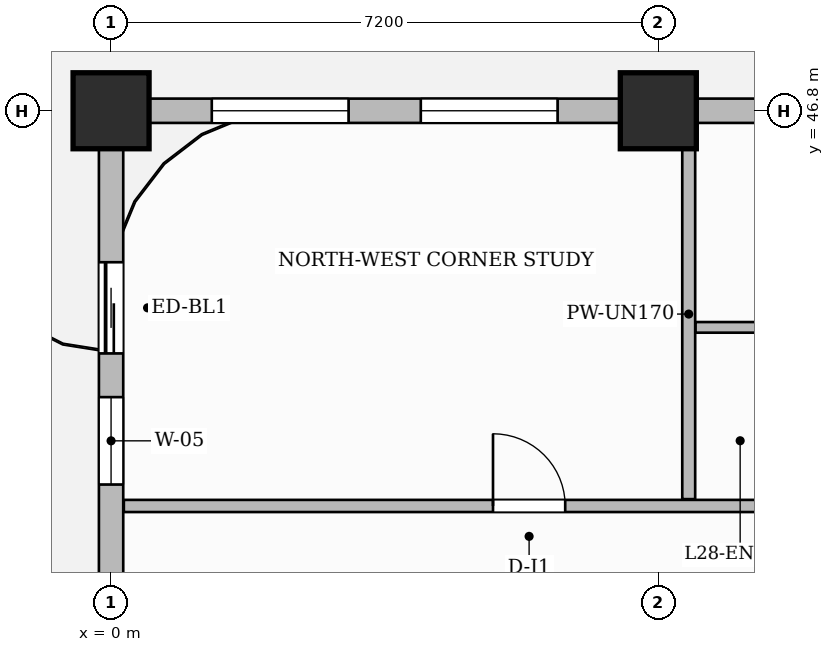
"""IFC4 building model, lengths in metres.
Left out: names, types, materials, properties, quantities, classifications, styles, units other than length and angle.
Written with IfcOpenShell. Run it as: python <this file> out.ifc"""

import sys

from ifc_helpers import new_model, si_unit, direction, frame, frame_2d, origin, origin_2d, place, context, subcontext, project, spatial, rectangle, extrude, source, transform, mapped, element, fill, save


model = new_model("IFC4")
c1 = context("Model", 3, precision=1e-05, world=origin(), true_north=direction((0.0, 1.0)))
c2 = subcontext(c1, "Body", "Model", "MODEL_VIEW")
j1 = project(units=[si_unit("LENGTHUNIT", "METRE"), si_unit("PLANEANGLEUNIT", "RADIAN")], contexts=[c1])
p1 = place(None, origin())
s1 = spatial("IfcSite", under=j1, at=p1, CompositionType="ELEMENT")
p2 = place(p1, origin())
s2 = spatial("IfcBuilding", under=s1, at=p2, CompositionType="ELEMENT")
p3 = place(p2, frame((0.0, 0.0, 115.5)))
s3 = spatial("IfcBuildingStorey", under=s2, at=p3, CompositionType="ELEMENT", Elevation=115.5)
m1 = source(origin(), c2, "Body", "SweptSolid", [
    extrude(rectangle(XDim=1.0, YDim=1.0, at=origin_2d()), origin(), (0.0, 0.0, 1.0), 3.7),
])
for number, where, z_axis, x_axis in (
    (1, (0.0, 46.8, 0.0), (0.0, 0.0, 1.0), (1.0, 0.0, 0.0)),
    (2, (7.2, 46.8, 0.0), (0.0, 0.0, 1.0), (1.0, 0.0, 0.0)),
):
    element("IfcColumn", number, at=place(p3, frame(where, z_axis=z_axis, x_axis=x_axis)), inside=s3, PredefinedType="COLUMN", context=c2, shape_type="MappedRepresentation", body=[
        mapped(m1, transform((0.0, 0.0, 0.0), scale=1.0)),
    ])
p4 = place(p3, frame((7.6, 41.69, 0.0), z_axis=(0.0, 0.0, 1.0), x_axis=(0.0, 1.0, 0.0)))
e3 = element("IfcWall", 3, at=p4, inside=s3, PredefinedType="PARTITIONING", context=c2, shape_type="SweptSolid", body=[
    extrude(rectangle(XDim=4.87, YDim=0.17, at=frame_2d((2.435, 0.0))), origin(), (0.0, 0.0, 1.0), 3.45),
])
p5 = place(p3, frame((0.168, 41.6, 0.0), z_axis=(0.0, 0.0, 1.0), x_axis=(1.0, 0.0, 0.0)))
e4 = element("IfcWall", 4, at=p5, inside=s3, PredefinedType="PARTITIONING", context=c2, shape_type="SweptSolid", body=[
    extrude(rectangle(XDim=14.792, YDim=0.16, at=frame_2d((7.396, 0.0))), origin(), (0.0, 0.0, 1.0), 2.935),
])
p6 = place(p5, frame((4.857, 0.0, 0.0)))
e5 = element("IfcOpeningElement", 5, at=p6, cuts=e4, PredefinedType="OPENING", context=c2, shape_type="SweptSolid", body=[
    extrude(rectangle(XDim=0.95, YDim=2.15, at=frame_2d((0.475, 1.075))), frame((0.0, 0.09, 0.0), z_axis=(0.0, -1.0, 0.0), x_axis=(1.0, 0.0, 0.0)), (0.0, 0.0, 1.0), 0.18),
])
p7 = place(p3, frame((7.69, 43.95, 0.0), z_axis=(0.0, 0.0, 1.0), x_axis=(1.0, 0.0, 0.0)))
e6 = element("IfcWall", 6, at=p7, inside=s3, PredefinedType="PARTITIONING", context=c2, shape_type="SweptSolid", body=[
    extrude(rectangle(XDim=2.07, YDim=0.14, at=frame_2d((1.035, 0.0))), origin(), (0.0, 0.0, 1.0), 2.935),
])
p8 = place(p3, frame((0.0, 25.25, 0.0), z_axis=(0.0, 0.0, 1.0), x_axis=(0.0, 1.0, 0.0)))
e7 = element("IfcWall", 7, at=p8, inside=s3, PredefinedType="SOLIDWALL", context=c2, shape_type="SweptSolid", body=[
    extrude(rectangle(XDim=21.5, YDim=0.32, at=frame_2d((10.75, 0.0))), origin(), (0.0, 0.0, 1.0), 2.935),
])
p9 = place(p8, frame((18.357, 0.0, 0.0)))
e8 = element("IfcOpeningElement", 8, at=p9, cuts=e7, PredefinedType="OPENING", context=c2, shape_type="SweptSolid", body=[
    extrude(rectangle(XDim=1.2, YDim=2.2, at=frame_2d((0.6, 1.1))), frame((0.0, 0.17, 0.0), z_axis=(0.0, -1.0, 0.0), x_axis=(1.0, 0.0, 0.0)), (0.0, 0.0, 1.0), 0.34),
])
p10 = place(p8, frame((0.8, 0.0, 0.0)))
e9 = element("IfcOpeningElement", 9, at=p10, cuts=e7, PredefinedType="OPENING", context=c2, shape_type="SweptSolid", body=[
    extrude(rectangle(XDim=1.2, YDim=2.2, at=frame_2d((0.6, 1.1))), frame((0.0, 0.17, 0.0), z_axis=(0.0, -1.0, 0.0), x_axis=(1.0, 0.0, 0.0)), (0.0, 0.0, 1.0), 0.34),
])
p11 = place(p8, frame((3.425, 0.0, 0.8)))
e10 = element("IfcOpeningElement", 10, at=p11, cuts=e7, PredefinedType="OPENING", context=c2, shape_type="SweptSolid", body=[
    extrude(rectangle(XDim=1.8, YDim=1.85, at=frame_2d((0.9, 0.925))), frame((0.0, 0.17, 0.0), z_axis=(0.0, -1.0, 0.0), x_axis=(1.0, 0.0, 0.0)), (0.0, 0.0, 1.0), 0.34),
])
p12 = place(p8, frame((8.475, 0.0, 0.8)))
e11 = element("IfcOpeningElement", 11, at=p12, cuts=e7, PredefinedType="OPENING", context=c2, shape_type="SweptSolid", body=[
    extrude(rectangle(XDim=1.8, YDim=1.85, at=frame_2d((0.9, 0.925))), frame((0.0, 0.17, 0.0), z_axis=(0.0, -1.0, 0.0), x_axis=(1.0, 0.0, 0.0)), (0.0, 0.0, 1.0), 0.34),
])
p13 = place(p8, frame((11.225, 0.0, 0.8)))
e12 = element("IfcOpeningElement", 12, at=p13, cuts=e7, PredefinedType="OPENING", context=c2, shape_type="SweptSolid", body=[
    extrude(rectangle(XDim=1.8, YDim=1.85, at=frame_2d((0.9, 0.925))), frame((0.0, 0.17, 0.0), z_axis=(0.0, -1.0, 0.0), x_axis=(1.0, 0.0, 0.0)), (0.0, 0.0, 1.0), 0.34),
])
p14 = place(p8, frame((16.632, 0.0, 0.8)))
e13 = element("IfcOpeningElement", 13, at=p14, cuts=e7, PredefinedType="OPENING", context=c2, shape_type="SweptSolid", body=[
    extrude(rectangle(XDim=1.15, YDim=1.8, at=frame_2d((0.575, 0.9))), frame((0.0, 0.17, 0.0), z_axis=(0.0, -1.0, 0.0), x_axis=(1.0, 0.0, 0.0)), (0.0, 0.0, 1.0), 0.34),
])
p15 = place(p3, frame((0.0, 46.8, 0.0), z_axis=(0.0, 0.0, 1.0), x_axis=(1.0, 0.0, 0.0)))
e14 = element("IfcWall", 14, at=p15, inside=s3, PredefinedType="SOLIDWALL", context=c2, shape_type="SweptSolid", body=[
    extrude(rectangle(XDim=18.0, YDim=0.32, at=frame_2d((9.0, 0.0))), origin(), (0.0, 0.0, 1.0), 2.935),
])
p16 = place(p15, frame((1.325, 0.0, 0.8)))
e15 = element("IfcOpeningElement", 15, at=p16, cuts=e14, PredefinedType="OPENING", context=c2, shape_type="SweptSolid", body=[
    extrude(rectangle(XDim=1.8, YDim=1.85, at=frame_2d((0.9, 0.925))), frame((0.0, 0.17, 0.0), z_axis=(0.0, -1.0, 0.0), x_axis=(1.0, 0.0, 0.0)), (0.0, 0.0, 1.0), 0.34),
])
p17 = place(p15, frame((4.075, 0.0, 0.8)))
e16 = element("IfcOpeningElement", 16, at=p17, cuts=e14, PredefinedType="OPENING", context=c2, shape_type="SweptSolid", body=[
    extrude(rectangle(XDim=1.8, YDim=1.85, at=frame_2d((0.9, 0.925))), frame((0.0, 0.17, 0.0), z_axis=(0.0, -1.0, 0.0), x_axis=(1.0, 0.0, 0.0)), (0.0, 0.0, 1.0), 0.34),
])
p18 = place(p15, frame((8.525, 0.0, 0.8)))
e17 = element("IfcOpeningElement", 17, at=p18, cuts=e14, PredefinedType="OPENING", context=c2, shape_type="SweptSolid", body=[
    extrude(rectangle(XDim=1.8, YDim=1.85, at=frame_2d((0.9, 0.925))), frame((0.0, 0.17, 0.0), z_axis=(0.0, -1.0, 0.0), x_axis=(1.0, 0.0, 0.0)), (0.0, 0.0, 1.0), 0.34),
])
p19 = place(p15, frame((11.275, 0.0, 0.8)))
e18 = element("IfcOpeningElement", 18, at=p19, cuts=e14, PredefinedType="OPENING", context=c2, shape_type="SweptSolid", body=[
    extrude(rectangle(XDim=1.8, YDim=1.85, at=frame_2d((0.9, 0.925))), frame((0.0, 0.17, 0.0), z_axis=(0.0, -1.0, 0.0), x_axis=(1.0, 0.0, 0.0)), (0.0, 0.0, 1.0), 0.34),
])
p20 = place(p15, frame((15.5, 0.0, 0.8)))
e19 = element("IfcOpeningElement", 19, at=p20, cuts=e14, PredefinedType="OPENING", context=c2, shape_type="SweptSolid", body=[
    extrude(rectangle(XDim=1.4, YDim=1.85, at=frame_2d((0.7, 0.925))), frame((0.0, 0.17, 0.0), z_axis=(0.0, -1.0, 0.0), x_axis=(1.0, 0.0, 0.0)), (0.0, 0.0, 1.0), 0.34),
])
m2 = source(origin(), c2, "Body", "SweptSolid", [
    extrude(rectangle(XDim=0.95, YDim=2.15, at=frame_2d((0.475, 1.075))), frame((0.0, 0.025, 0.0), z_axis=(0.0, -1.0, 0.0), x_axis=(1.0, 0.0, 0.0)), (0.0, 0.0, 1.0), 0.05),
])
p21 = place(p6, origin())
e20 = element("IfcDoor", 20, at=p21, inside=s3, OperationType="SINGLE_SWING_LEFT", PredefinedType="DOOR", context=c2, shape_type="MappedRepresentation", body=[
    mapped(m2, transform((0.0, 0.0, 0.0), scale=1.0)),
])
fill(e5, e20)
m3 = source(origin(), c2, "Body", "SweptSolid", [
    extrude(rectangle(XDim=1.2, YDim=2.2, at=frame_2d((0.6, 1.1))), frame((0.0, 0.025, 0.0), z_axis=(0.0, -1.0, 0.0), x_axis=(1.0, 0.0, 0.0)), (0.0, 0.0, 1.0), 0.05),
])
p22 = place(p9, origin())
e21 = element("IfcDoor", 21, at=p22, inside=s3, OperationType="SLIDING_TO_LEFT", PredefinedType="DOOR", context=c2, shape_type="MappedRepresentation", body=[
    mapped(m3, transform((0.0, 0.0, 0.0), scale=1.0)),
])
fill(e8, e21)
m4 = source(origin(), c2, "Body", "SweptSolid", [
    extrude(rectangle(XDim=1.15, YDim=1.8, at=frame_2d((0.575, 0.9))), frame((0.0, 0.03, 0.0), z_axis=(0.0, -1.0, 0.0), x_axis=(1.0, 0.0, 0.0)), (0.0, 0.0, 1.0), 0.06),
])
p23 = place(p14, origin())
e22 = element("IfcWindow", 22, at=p23, inside=s3, PartitioningType="SINGLE_PANEL", PredefinedType="WINDOW", context=c2, shape_type="MappedRepresentation", body=[
    mapped(m4, transform((0.0, 0.0, 0.0), scale=1.0)),
])
fill(e13, e22)
m5 = source(origin(), c2, "Body", "SweptSolid", [
    extrude(rectangle(XDim=1.8, YDim=1.85, at=frame_2d((0.9, 0.925))), frame((0.0, 0.03, 0.0), z_axis=(0.0, -1.0, 0.0), x_axis=(1.0, 0.0, 0.0)), (0.0, 0.0, 1.0), 0.06),
])
p24 = place(p16, origin())
e23 = element("IfcWindow", 23, at=p24, inside=s3, PartitioningType="DOUBLE_PANEL_VERTICAL", PredefinedType="WINDOW", context=c2, shape_type="MappedRepresentation", body=[
    mapped(m5, transform((0.0, 0.0, 0.0), scale=1.0)),
])
fill(e15, e23)
p25 = place(p17, origin())
e24 = element("IfcWindow", 24, at=p25, inside=s3, PartitioningType="DOUBLE_PANEL_VERTICAL", PredefinedType="WINDOW", context=c2, shape_type="MappedRepresentation", body=[
    mapped(m5, transform((0.0, 0.0, 0.0), scale=1.0)),
])
fill(e16, e24)
save(model, sys.argv[1])
